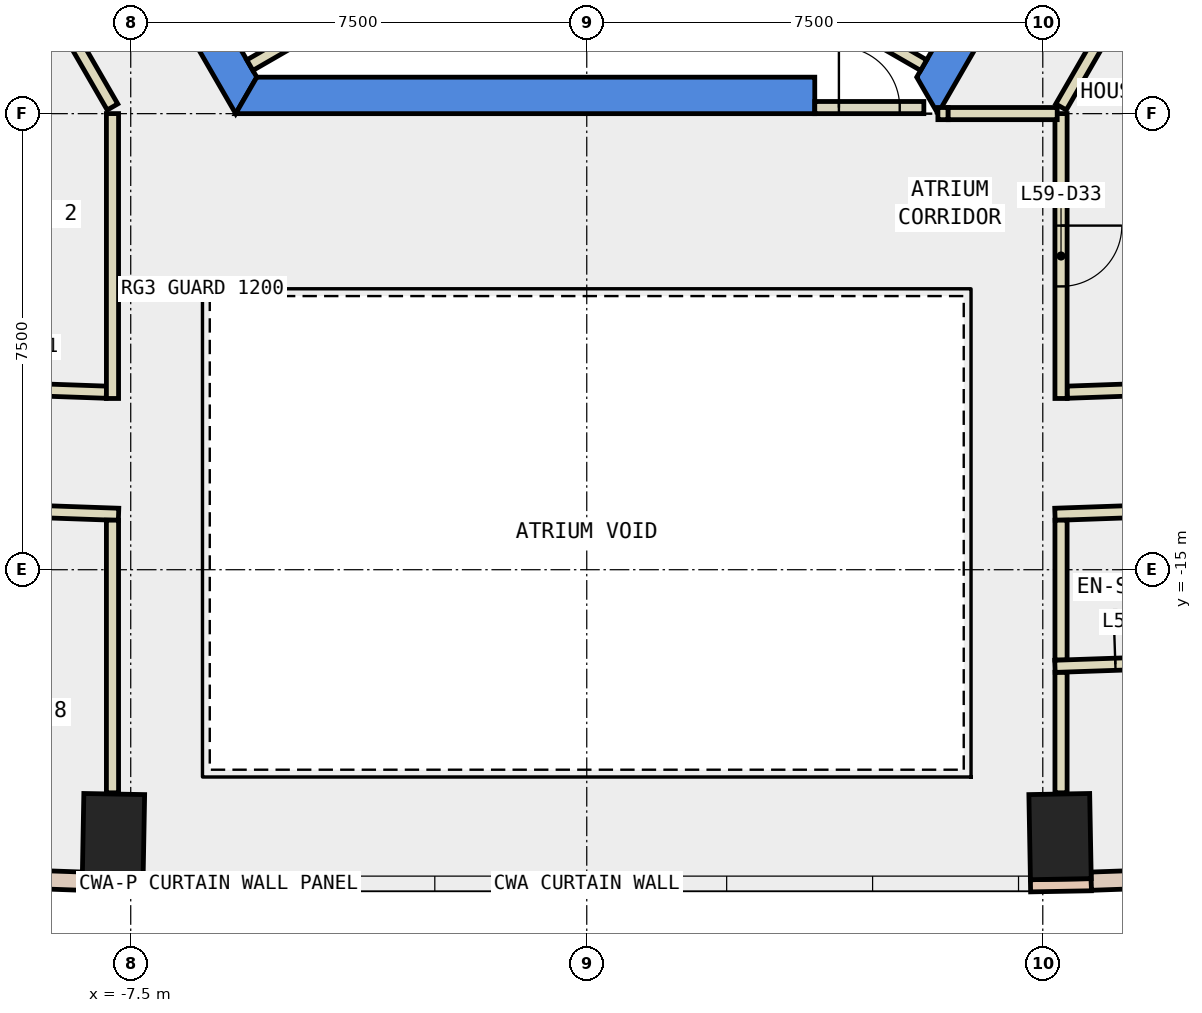
"""IFC4 building model, lengths in metres.
Left out: names, types, materials, properties, quantities, classifications, styles, units other than length and angle.
Written with IfcOpenShell. Run it as: python <this file> out.ifc"""

import sys

from ifc_helpers import new_model, si_unit, direction, frame, frame_2d, origin, origin_2d, place, context, subcontext, project, spatial, polyline, rectangle, outline, extrude, element, fill, save


model = new_model("IFC4")
c1 = context("Model", 3, precision=1e-05, world=origin(), true_north=direction((0.0, 1.0)))
c2 = subcontext(c1, "Body", "Model", "MODEL_VIEW")
j1 = project(units=[si_unit("LENGTHUNIT", "METRE"), si_unit("PLANEANGLEUNIT", "RADIAN")], contexts=[c1])
p1 = place(None, origin())
s1 = spatial("IfcSite", under=j1, at=p1, CompositionType="ELEMENT")
p2 = place(p1, origin())
s2 = spatial("IfcBuilding", under=s1, at=p2, CompositionType="ELEMENT")
p3 = place(p2, frame((0.0, 0.0, 259.4)))
s3 = spatial("IfcBuildingStorey", under=s2, at=p3, CompositionType="ELEMENT", Elevation=259.4)
for number, where, z_axis, x_axis in (
    (1, (-7.784, -19.389, -0.34), (0.0, 0.0, 1.0), (-1.0, 0.018, 0.0)),
    (2, (7.784, -19.389, -0.34), (0.0, 0.0, 1.0), (1.0, 0.018, 0.0)),
):
    element("IfcColumn", number, at=place(p3, frame(where, z_axis=z_axis, x_axis=x_axis)), inside=s3, PredefinedType="COLUMN", context=c2, shape_type="SweptSolid", body=[
        extrude(rectangle(XDim=1.0, YDim=1.4, at=origin_2d()), origin(), (0.0, 0.0, 1.0), 3.6),
    ])
p4 = place(p3, frame((0.0, 0.0, -0.34)))
e3 = element("IfcWall", 3, at=p4, inside=s3, PredefinedType="SHEAR", context=c2, shape_type="SweptSolid", body=[
    extrude(outline(polyline([(-11.547, 2.5), (-5.774, -7.5), (-5.427, -6.9), (-10.854, 2.5), (-11.547, 2.5)])), origin(), (0.0, 0.0, 1.0), 3.6),
])
p5 = place(p3, frame((0.0, 0.0, -0.34)))
e4 = element("IfcWall", 4, at=p5, inside=s3, PredefinedType="SHEAR", context=c2, shape_type="SweptSolid", body=[
    extrude(outline(polyline([(3.75, -7.5), (3.75, -6.9), (-5.427, -6.9), (-5.774, -7.5), (3.75, -7.5)])), origin(), (0.0, 0.0, 1.0), 3.6),
])
p6 = place(p3, frame((0.0, 0.0, -0.34)))
e5 = element("IfcWall", 5, at=p6, inside=s3, PredefinedType="SHEAR", context=c2, shape_type="SweptSolid", body=[
    extrude(outline(polyline([(5.774, -7.5), (11.547, 2.5), (10.854, 2.5), (5.427, -6.9), (5.774, -7.5)])), origin(), (0.0, 0.0, 1.0), 3.6),
])
for number, where, z_axis, x_axis in (
    (6, (7.578, -4.375, -0.34), (0.0, 0.0, 1.0), (0.866, -0.5, 0.0)),
    (7, (-7.578, -4.375, -0.34), (0.0, 0.0, 1.0), (-0.866, -0.5, 0.0)),
):
    element("IfcWall", number, at=place(p3, frame(where, z_axis=z_axis, x_axis=x_axis)), inside=s3, PredefinedType="SHEAR", context=c2, shape_type="SweptSolid", body=[
        extrude(rectangle(XDim=9.0, YDim=0.8, at=frame_2d((4.5, 0.0))), origin(), (0.0, 0.0, 1.0), 3.6),
    ])
for number, where, z_axis, x_axis in (
    (8, (-8.298, -20.18, 0.0), (0.0, 0.0, 1.0), (1.0, -0.018, 0.0)),
    (9, (7.298, -20.198, 0.0), (0.0, 0.0, 1.0), (1.0, 0.018, 0.0)),
):
    element("IfcWall", number, at=place(p3, frame(where, z_axis=z_axis, x_axis=x_axis)), inside=s3, PredefinedType="STANDARD", context=c2, shape_type="SweptSolid", body=[
        extrude(rectangle(XDim=1.0, YDim=0.2, at=frame_2d((0.5, 0.0))), origin(), (0.0, 0.0, 1.0), 3.26),
    ])
p7 = place(p3, frame((-15.952, -19.854, 0.0), z_axis=(0.0, 0.0, 1.0), x_axis=(0.999387577449, -0.034992428331, 0.0)))
e10 = element("IfcWall", 10, at=p7, inside=s3, PredefinedType="STANDARD", context=c2, shape_type="SweptSolid", body=[
    extrude(rectangle(XDim=7.661, YDim=0.3, at=frame_2d((3.83, 0.0))), origin(), (0.0, 0.0, 1.0), 3.26),
])
p8 = place(p7, frame((0.815, 0.0, 0.9)))
e11 = element("IfcOpeningElement", 11, at=p8, cuts=e10, PredefinedType="OPENING", context=c2, shape_type="SweptSolid", body=[
    extrude(rectangle(XDim=2.2, YDim=2.0, at=frame_2d((1.1, 1.0))), frame((0.0, 0.16, 0.0), z_axis=(0.0, -1.0, 0.0), x_axis=(1.0, 0.0, 0.0)), (0.0, 0.0, 1.0), 0.32),
])
p9 = place(p7, frame((4.646, 0.0, 0.9)))
e12 = element("IfcOpeningElement", 12, at=p9, cuts=e10, PredefinedType="OPENING", context=c2, shape_type="SweptSolid", body=[
    extrude(rectangle(XDim=2.2, YDim=2.0, at=frame_2d((1.1, 1.0))), frame((0.0, 0.16, 0.0), z_axis=(0.0, -1.0, 0.0), x_axis=(1.0, 0.0, 0.0)), (0.0, 0.0, 1.0), 0.32),
])
p10 = place(p3, frame((8.296, -20.122, 0.0), z_axis=(0.0, 0.0, 1.0), x_axis=(0.999387577449, 0.034992428331, 0.0)))
e13 = element("IfcWall", 13, at=p10, inside=s3, PredefinedType="STANDARD", context=c2, shape_type="SweptSolid", body=[
    extrude(rectangle(XDim=7.661, YDim=0.3, at=frame_2d((3.83, 0.0))), origin(), (0.0, 0.0, 1.0), 3.26),
])
p11 = place(p10, frame((0.815, 0.0, 0.9)))
e14 = element("IfcOpeningElement", 14, at=p11, cuts=e13, PredefinedType="OPENING", context=c2, shape_type="SweptSolid", body=[
    extrude(rectangle(XDim=2.2, YDim=2.0, at=frame_2d((1.1, 1.0))), frame((0.0, 0.16, 0.0), z_axis=(0.0, -1.0, 0.0), x_axis=(1.0, 0.0, 0.0)), (0.0, 0.0, 1.0), 0.32),
])
p12 = place(p10, frame((4.646, 0.0, 0.9)))
e15 = element("IfcOpeningElement", 15, at=p12, cuts=e13, PredefinedType="OPENING", context=c2, shape_type="SweptSolid", body=[
    extrude(rectangle(XDim=2.2, YDim=2.0, at=frame_2d((1.1, 1.0))), frame((0.0, 0.16, 0.0), z_axis=(0.0, -1.0, 0.0), x_axis=(1.0, 0.0, 0.0)), (0.0, 0.0, 1.0), 0.32),
])
p13 = place(p3, frame((7.9, -12.081, 0.0), z_axis=(0.0, 0.0, 1.0), x_axis=(0.999365240621, 0.035624652105, 0.0)))
e16 = element("IfcWall", 16, at=p13, inside=s3, PredefinedType="PARTITIONING", context=c2, shape_type="SweptSolid", body=[
    extrude(rectangle(XDim=1.042, YDim=0.2, at=frame_2d((0.521, 0.0))), origin(), (0.0, 0.0, 1.0), 3.26),
])
p14 = place(p3, frame((-7.8, -7.39, 0.0), z_axis=(0.0, 0.0, 1.0), x_axis=(-0.500266477503, 0.865871498253, 0.0)))
e17 = element("IfcWall", 17, at=p14, inside=s3, PredefinedType="PARTITIONING", context=c2, shape_type="SweptSolid", body=[
    extrude(rectangle(XDim=1.463, YDim=0.2, at=frame_2d((0.731, 0.0))), origin(), (0.0, 0.0, 1.0), 3.26),
])
p15 = place(p3, frame((-10.826, -11.978, 0.0), z_axis=(0.0, 0.0, 1.0), x_axis=(0.999380679818, -0.035188873332, 0.0)))
e18 = element("IfcWall", 18, at=p15, inside=s3, PredefinedType="PARTITIONING", context=c2, shape_type="SweptSolid", body=[
    extrude(rectangle(XDim=2.928, YDim=0.2, at=frame_2d((1.464, 0.0))), origin(), (0.0, 0.0, 1.0), 3.26),
])
p16 = place(p15, frame((0.964, 0.0, 0.0)))
e19 = element("IfcOpeningElement", 19, at=p16, cuts=e18, PredefinedType="OPENING", context=c2, shape_type="SweptSolid", body=[
    extrude(rectangle(XDim=1.0, YDim=2.1, at=frame_2d((0.5, 1.05))), frame((0.0, 0.11, 0.0), z_axis=(0.0, -1.0, 0.0), x_axis=(1.0, 0.0, 0.0)), (0.0, 0.0, 1.0), 0.22),
])
p17 = place(p3, frame((10.298, -13.998, 0.0), z_axis=(0.0, 0.0, 1.0), x_axis=(-0.999386321032, -0.035028293342, 0.0)))
e20 = element("IfcWall", 20, at=p17, inside=s3, PredefinedType="PARTITIONING", context=c2, shape_type="SweptSolid", body=[
    extrude(rectangle(XDim=2.6, YDim=0.2, at=frame_2d((1.3, 0.0))), origin(), (0.0, 0.0, 1.0), 3.26),
])
p18 = place(p3, frame((-7.7, -14.089, 0.0), z_axis=(0.0, 0.0, 1.0), x_axis=(-0.999388410674, 0.034968623214, 0.0)))
e21 = element("IfcWall", 21, at=p18, inside=s3, PredefinedType="PARTITIONING", context=c2, shape_type="SweptSolid", body=[
    extrude(rectangle(XDim=5.264, YDim=0.2, at=frame_2d((2.632, 0.0))), origin(), (0.0, 0.0, 1.0), 3.26),
])
p19 = place(p18, frame((2.182, 0.0, 0.0)))
e22 = element("IfcOpeningElement", 22, at=p19, cuts=e21, PredefinedType="OPENING", context=c2, shape_type="SweptSolid", body=[
    extrude(rectangle(XDim=1.0, YDim=2.1, at=frame_2d((0.5, 1.05))), frame((0.0, 0.11, 0.0), z_axis=(0.0, -1.0, 0.0), x_axis=(1.0, 0.0, 0.0)), (0.0, 0.0, 1.0), 0.22),
])
for number, where, z_axis, x_axis in (
    (23, (5.541, -6.703, 0.0), (0.0, 0.0, 1.0), (-0.866, 0.5, 0.0)),
    (24, (-4.588, -6.153, 0.0), (0.0, 0.0, 1.0), (-0.866, -0.5, 0.0)),
):
    element("IfcWall", number, at=place(p3, frame(where, z_axis=z_axis, x_axis=x_axis)), inside=s3, PredefinedType="PARTITIONING", context=c2, shape_type="SweptSolid", body=[
        extrude(rectangle(XDim=1.1, YDim=0.2, at=frame_2d((0.55, 0.0))), origin(), (0.0, 0.0, 1.0), 3.26),
    ])
p20 = place(p3, frame((5.775, -7.499, 0.0), z_axis=(0.0, 0.0, 1.0), x_axis=(1.0, 0.0, 0.0)))
e25 = element("IfcWall", 25, at=p20, inside=s3, PredefinedType="PARTITIONING", context=c2, shape_type="SweptSolid", body=[
    extrude(rectangle(XDim=0.169, YDim=0.2, at=frame_2d((0.084, 0.0))), origin(), (0.0, 0.0, 1.0), 2.4),
])
p21 = place(p3, frame((7.8, -7.39, 0.0), z_axis=(0.0, 0.0, 1.0), x_axis=(0.499977374825, 0.866038466041, 0.0)))
e26 = element("IfcWall", 26, at=p21, inside=s3, PredefinedType="PARTITIONING", context=c2, shape_type="SweptSolid", body=[
    extrude(rectangle(XDim=2.1, YDim=0.2, at=frame_2d((1.05, 0.0))), origin(), (0.0, 0.0, 1.0), 3.26),
])
p22 = place(p3, frame((7.8, -7.499, 0.0), z_axis=(0.0, 0.0, 1.0), x_axis=(0.0, -1.0, 0.0)))
e27 = element("IfcWall", 27, at=p22, inside=s3, PredefinedType="PARTITIONING", context=c2, shape_type="SweptSolid", body=[
    extrude(rectangle(XDim=4.685, YDim=0.2, at=frame_2d((2.343, 0.0))), origin(), (0.0, 0.0, 1.0), 3.26),
])
p23 = place(p22, frame((1.842, 0.0, 0.0)))
e28 = element("IfcOpeningElement", 28, at=p23, cuts=e27, PredefinedType="OPENING", context=c2, shape_type="SweptSolid", body=[
    extrude(rectangle(XDim=1.0, YDim=2.1, at=frame_2d((0.5, 1.05))), frame((0.0, 0.11, 0.0), z_axis=(0.0, -1.0, 0.0), x_axis=(1.0, 0.0, 0.0)), (0.0, 0.0, 1.0), 0.22),
])
p24 = place(p3, frame((-7.8, -12.184, 0.0), z_axis=(0.0, 0.0, 1.0), x_axis=(0.0, 1.0, 0.0)))
e29 = element("IfcWall", 29, at=p24, inside=s3, PredefinedType="PARTITIONING", context=c2, shape_type="SweptSolid", body=[
    extrude(rectangle(XDim=4.685, YDim=0.2, at=frame_2d((2.343, 0.0))), origin(), (0.0, 0.0, 1.0), 3.26),
])
p25 = place(p3, frame((7.8, -16.686, 0.0), z_axis=(0.0, 0.0, 1.0), x_axis=(0.0, -1.0, 0.0)))
e30 = element("IfcWall", 30, at=p25, inside=s3, PredefinedType="PARTITIONING", context=c2, shape_type="SweptSolid", body=[
    extrude(rectangle(XDim=1.983, YDim=0.2, at=frame_2d((0.991, 0.0))), origin(), (0.0, 0.0, 1.0), 3.26),
])
p26 = place(p3, frame((7.8, -14.185, 0.0), z_axis=(0.0, 0.0, 1.0), x_axis=(0.0, -1.0, 0.0)))
e31 = element("IfcWall", 31, at=p26, inside=s3, PredefinedType="PARTITIONING", context=c2, shape_type="SweptSolid", body=[
    extrude(rectangle(XDim=2.301, YDim=0.2, at=frame_2d((1.15, 0.0))), origin(), (0.0, 0.0, 1.0), 3.26),
])
p27 = place(p3, frame((-7.8, -18.669, 0.0), z_axis=(0.0, 0.0, 1.0), x_axis=(0.0, 1.0, 0.0)))
e32 = element("IfcWall", 32, at=p27, inside=s3, PredefinedType="PARTITIONING", context=c2, shape_type="SweptSolid", body=[
    extrude(rectangle(XDim=4.484, YDim=0.2, at=frame_2d((2.242, 0.0))), origin(), (0.0, 0.0, 1.0), 3.26),
])
p28 = place(p3, frame((-8.582, -6.036, 0.0), z_axis=(0.0, 0.0, 1.0), x_axis=(-0.897105141673, -0.441817116897, 0.0)))
e33 = element("IfcWall", 33, at=p28, inside=s3, PredefinedType="PARTITIONING", context=c2, shape_type="SweptSolid", body=[
    extrude(rectangle(XDim=5.111, YDim=0.2, at=frame_2d((2.555, 0.0))), origin(), (0.0, 0.0, 1.0), 3.26),
])
p29 = place(p3, frame((7.7, -16.589, 0.0), z_axis=(0.0, 0.0, 1.0), x_axis=(0.999410709261, 0.034325416459, 0.0)))
e34 = element("IfcWall", 34, at=p29, inside=s3, PredefinedType="PARTITIONING", context=c2, shape_type="SweptSolid", body=[
    extrude(rectangle(XDim=2.888, YDim=0.2, at=frame_2d((1.444, 0.0))), origin(), (0.0, 0.0, 1.0), 3.26),
])
p30 = place(p29, frame((0.994, 0.0, 0.0)))
e35 = element("IfcOpeningElement", 35, at=p30, cuts=e34, PredefinedType="OPENING", context=c2, shape_type="SweptSolid", body=[
    extrude(rectangle(XDim=0.9, YDim=2.1, at=frame_2d((0.45, 1.05))), frame((0.0, 0.11, 0.0), z_axis=(0.0, -1.0, 0.0), x_axis=(1.0, 0.0, 0.0)), (0.0, 0.0, 1.0), 0.22),
])
p31 = place(p3, frame((3.75, -7.4, 0.0), z_axis=(0.0, 0.0, 1.0), x_axis=(1.0, 0.0, 0.0)))
e36 = element("IfcWall", 36, at=p31, inside=s3, PredefinedType="PARTITIONING", context=c2, shape_type="SweptSolid", body=[
    extrude(rectangle(XDim=1.794, YDim=0.2, at=frame_2d((0.897, 0.0))), origin(), (0.0, 0.0, 1.0), 2.4),
])
p32 = place(p31, frame((0.397, 0.0, 0.0)))
e37 = element("IfcOpeningElement", 37, at=p32, cuts=e36, PredefinedType="OPENING", context=c2, shape_type="SweptSolid", body=[
    extrude(rectangle(XDim=1.0, YDim=2.1, at=frame_2d((0.5, 1.05))), frame((0.0, 0.11, 0.0), z_axis=(0.0, -1.0, 0.0), x_axis=(1.0, 0.0, 0.0)), (0.0, 0.0, 1.0), 0.22),
])
p33 = place(p3, frame((5.944, -7.499, 0.0), z_axis=(0.0, 0.0, 1.0), x_axis=(1.0, 0.0, 0.0)))
e38 = element("IfcWall", 38, at=p33, inside=s3, PredefinedType="PARTITIONING", context=c2, shape_type="SweptSolid", body=[
    extrude(rectangle(XDim=1.793, YDim=0.2, at=frame_2d((0.896, 0.0))), origin(), (0.0, 0.0, 1.0), 3.26),
])
p34 = place(p30, origin())
e39 = element("IfcDoor", 39, at=p34, inside=s3, OperationType="SINGLE_SWING_LEFT", PredefinedType="DOOR", context=c2, shape_type="SweptSolid", body=[
    extrude(rectangle(XDim=0.9, YDim=2.1, at=frame_2d((0.45, 1.05))), frame((0.0, 0.025, 0.0), z_axis=(0.0, -1.0, 0.0), x_axis=(1.0, 0.0, 0.0)), (0.0, 0.0, 1.0), 0.05),
])
fill(e35, e39)
p35 = place(p23, origin())
e40 = element("IfcDoor", 40, at=p35, inside=s3, OperationType="SINGLE_SWING_LEFT", PredefinedType="DOOR", context=c2, shape_type="SweptSolid", body=[
    extrude(rectangle(XDim=1.0, YDim=2.1, at=frame_2d((0.5, 1.05))), frame((0.0, 0.025, 0.0), z_axis=(0.0, -1.0, 0.0), x_axis=(1.0, 0.0, 0.0)), (0.0, 0.0, 1.0), 0.05),
])
fill(e28, e40)
p36 = place(p32, origin())
e41 = element("IfcDoor", 41, at=p36, inside=s3, OperationType="SINGLE_SWING_LEFT", PredefinedType="DOOR", context=c2, shape_type="SweptSolid", body=[
    extrude(rectangle(XDim=1.0, YDim=2.1, at=frame_2d((0.5, 1.05))), frame((0.0, 0.025, 0.0), z_axis=(0.0, -1.0, 0.0), x_axis=(1.0, 0.0, 0.0)), (0.0, 0.0, 1.0), 0.05),
])
fill(e37, e41)
save(model, sys.argv[1])
